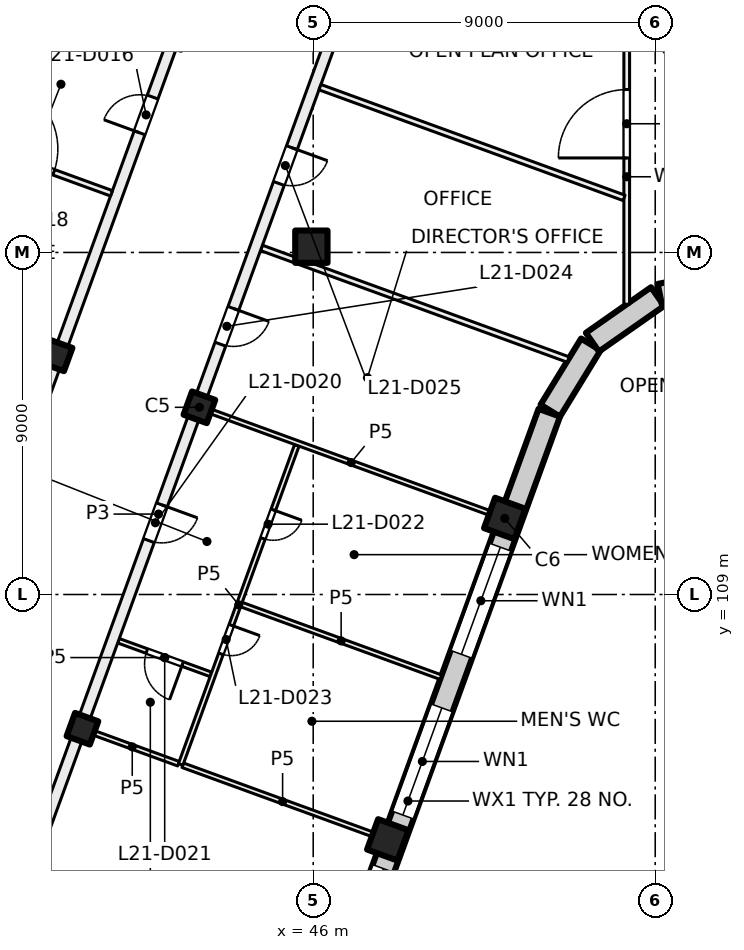
"""IFC4 building model, lengths in metres.
Left out: names, types, materials, properties, quantities, classifications, styles, units other than length and angle.
Written with IfcOpenShell. Run it as: python <this file> out.ifc"""

import sys

from ifc_helpers import new_model, si_unit, direction, frame, frame_2d, origin, origin_2d, place, context, subcontext, project, spatial, rectangle, hollow_rectangle, extrude, element, fill, save


model = new_model("IFC4")
c1 = context("Model", 3, precision=1e-05, world=origin(), true_north=direction((0.0, 1.0)))
c2 = subcontext(c1, "Body", "Model", "MODEL_VIEW")
j1 = project(units=[si_unit("LENGTHUNIT", "METRE"), si_unit("PLANEANGLEUNIT", "RADIAN")], contexts=[c1])
p1 = place(None, origin())
s1 = spatial("IfcSite", under=j1, at=p1, CompositionType="ELEMENT")
p2 = place(p1, origin())
s2 = spatial("IfcBuilding", under=s1, at=p2, CompositionType="ELEMENT")
p3 = place(p2, frame((0.0, 0.0, 93.0)))
s3 = spatial("IfcBuildingStorey", under=s2, at=p3, CompositionType="ELEMENT", Elevation=93.0)
p4 = place(p3, frame((56.036, 123.43, 0.0), z_axis=(0.0, 0.0, 1.0), x_axis=(0.573576436351, -0.819152044289, 0.0)))
e1 = element("IfcColumn", 1, at=p4, inside=s3, PredefinedType="COLUMN", context=c2, shape_type="SweptSolid", body=[
    extrude(hollow_rectangle(XDim=1.4, YDim=1.4, WallThickness=0.04, at=origin_2d()), origin(), (0.0, 0.0, 1.0), 4.0),
])
p5 = place(p3, frame((45.952, 118.152, 0.0), z_axis=(0.0, 0.0, 1.0), x_axis=(1.0, 0.0, 0.0)))
e2 = element("IfcColumn", 2, at=p5, inside=s3, PredefinedType="COLUMN", context=c2, shape_type="SweptSolid", body=[
    extrude(rectangle(XDim=0.85, YDim=0.85, at=origin_2d()), origin(), (0.0, 0.0, 1.0), 4.0),
])
for number, where, z_axis, x_axis in (
    (3, (43.006, 113.925, 0.0), (0.0, 0.0, 1.0), (-0.342, -0.94, 0.0)),
    (4, (39.927, 105.468, 0.0), (0.0, 0.0, 1.0), (-0.342, -0.94, 0.0)),
    (5, (39.247, 115.293, 0.0), (0.0, 0.0, 1.0), (-0.342, -0.94, 0.0)),
):
    element("IfcColumn", number, at=place(p3, frame(where, z_axis=z_axis, x_axis=x_axis)), inside=s3, PredefinedType="COLUMN", context=c2, shape_type="SweptSolid", body=[
        extrude(rectangle(XDim=0.65, YDim=0.65, at=origin_2d()), origin(), (0.0, 0.0, 1.0), 4.0),
    ])
for number, where, z_axis, x_axis in (
    (6, (51.04, 111.001, 0.0), (0.0, 0.0, 1.0), (-0.342, -0.94, 0.0)),
    (7, (47.962, 102.544, 0.0), (0.0, 0.0, 1.0), (-0.342, -0.94, 0.0)),
):
    element("IfcColumn", number, at=place(p3, frame(where, z_axis=z_axis, x_axis=x_axis)), inside=s3, PredefinedType="COLUMN", context=c2, shape_type="SweptSolid", body=[
        extrude(rectangle(XDim=0.85, YDim=0.85, at=origin_2d()), origin(), (0.0, 0.0, 1.0), 4.0),
    ])
p6 = place(p3, frame((52.212, 113.783, 0.0), z_axis=(0.0, 0.0, 1.0), x_axis=(-0.34202521188, -0.939690775968, 0.0)))
e8 = element("IfcWall", 8, at=p6, inside=s3, PredefinedType="SOLIDWALL", context=c2, shape_type="SweptSolid", body=[
    extrude(rectangle(XDim=21.745, YDim=0.6, at=frame_2d((10.873, 0.0))), origin(), (0.0, 0.0, 1.0), 3.625),
])
p7 = place(p6, frame((3.765, 0.0, 0.9)))
e9 = element("IfcOpeningElement", 9, at=p7, cuts=e8, PredefinedType="OPENING", context=c2, shape_type="SweptSolid", body=[
    extrude(rectangle(XDim=3.0, YDim=2.4, at=frame_2d((1.5, 1.2))), frame((0.0, 0.31, 0.0), z_axis=(0.0, -1.0, 0.0), x_axis=(1.0, 0.0, 0.0)), (0.0, 0.0, 1.0), 0.62),
])
p8 = place(p6, frame((8.265, 0.0, 0.9)))
e10 = element("IfcOpeningElement", 10, at=p8, cuts=e8, PredefinedType="OPENING", context=c2, shape_type="SweptSolid", body=[
    extrude(rectangle(XDim=3.0, YDim=2.4, at=frame_2d((1.5, 1.2))), frame((0.0, 0.31, 0.0), z_axis=(0.0, -1.0, 0.0), x_axis=(1.0, 0.0, 0.0)), (0.0, 0.0, 1.0), 0.62),
])
p9 = place(p6, frame((12.765, 0.0, 0.9)))
e11 = element("IfcOpeningElement", 11, at=p9, cuts=e8, PredefinedType="OPENING", context=c2, shape_type="SweptSolid", body=[
    extrude(rectangle(XDim=3.0, YDim=2.4, at=frame_2d((1.5, 1.2))), frame((0.0, 0.31, 0.0), z_axis=(0.0, -1.0, 0.0), x_axis=(1.0, 0.0, 0.0)), (0.0, 0.0, 1.0), 0.62),
])
p10 = place(p6, frame((17.265, 0.0, 0.9)))
e12 = element("IfcOpeningElement", 12, at=p10, cuts=e8, PredefinedType="OPENING", context=c2, shape_type="SweptSolid", body=[
    extrude(rectangle(XDim=3.0, YDim=2.4, at=frame_2d((1.5, 1.2))), frame((0.0, 0.31, 0.0), z_axis=(0.0, -1.0, 0.0), x_axis=(1.0, 0.0, 0.0)), (0.0, 0.0, 1.0), 0.62),
])
p11 = place(p3, frame((53.305, 115.578, 0.0), z_axis=(0.0, 0.0, 1.0), x_axis=(-0.522402266438, -0.852699168535, 0.0)))
e13 = element("IfcWall", 13, at=p11, inside=s3, PredefinedType="SOLIDWALL", context=c2, shape_type="SweptSolid", body=[
    extrude(rectangle(XDim=2.042, YDim=0.6, at=frame_2d((1.021, 0.0))), origin(), (0.0, 0.0, 1.0), 3.625),
])
for number, where, z_axis, x_axis in (
    (14, (55.062, 116.839, 0.0), (0.0, 0.0, 1.0), (-0.819, -0.574, 0.0)),
    (15, (57.175, 117.294, 0.0), (0.0, 0.0, 1.0), (-0.98, -0.199, 0.0)),
):
    element("IfcWall", number, at=place(p3, frame(where, z_axis=z_axis, x_axis=x_axis)), inside=s3, PredefinedType="SOLIDWALL", context=c2, shape_type="SweptSolid", body=[
        extrude(rectangle(XDim=2.092, YDim=0.6, at=frame_2d((1.046, 0.0))), origin(), (0.0, 0.0, 1.0), 3.625),
    ])
p12 = place(p3, frame((31.353, 118.166, 0.0), z_axis=(0.0, 0.0, 1.0), x_axis=(0.939687752599, -0.342033518263, 0.0)))
e16 = element("IfcWall", 16, at=p12, inside=s3, PredefinedType="PARTITIONING", context=c2, shape_type="SweptSolid", body=[
    extrude(rectangle(XDim=8.301, YDim=0.15, at=frame_2d((4.15, 0.0))), origin(), (0.0, 0.0, 1.0), 3.625),
])
p13 = place(p3, frame((32.881, 97.657, 0.0), z_axis=(0.0, 0.0, 1.0), x_axis=(0.342017360004, 0.939693633828, 0.0)))
e17 = element("IfcWall", 17, at=p13, inside=s3, PredefinedType="PARTITIONING", context=c2, shape_type="SweptSolid", body=[
    extrude(rectangle(XDim=34.516, YDim=0.3, at=frame_2d((17.258, 0.0))), origin(), (0.0, 0.0, 1.0), 3.625),
])
p14 = place(p13, frame((7.475, 0.0, 0.0)))
e18 = element("IfcOpeningElement", 18, at=p14, cuts=e17, PredefinedType="OPENING", context=c2, shape_type="SweptSolid", body=[
    extrude(rectangle(XDim=1.8, YDim=2.1, at=frame_2d((0.9, 1.05))), frame((0.0, 0.16, 0.0), z_axis=(0.0, -1.0, 0.0), x_axis=(1.0, 0.0, 0.0)), (0.0, 0.0, 1.0), 0.32),
])
p15 = place(p13, frame((25.0, 0.0, 0.0)))
e19 = element("IfcOpeningElement", 19, at=p15, cuts=e17, PredefinedType="OPENING", context=c2, shape_type="SweptSolid", body=[
    extrude(rectangle(XDim=1.0, YDim=2.1, at=frame_2d((0.5, 1.05))), frame((0.0, 0.16, 0.0), z_axis=(0.0, -1.0, 0.0), x_axis=(1.0, 0.0, 0.0)), (0.0, 0.0, 1.0), 0.32),
])
p16 = place(p13, frame((29.779, 0.0, 0.0)))
e20 = element("IfcOpeningElement", 20, at=p16, cuts=e17, PredefinedType="OPENING", context=c2, shape_type="SweptSolid", body=[
    extrude(rectangle(XDim=1.8, YDim=2.1, at=frame_2d((0.9, 1.05))), frame((0.0, 0.16, 0.0), z_axis=(0.0, -1.0, 0.0), x_axis=(1.0, 0.0, 0.0)), (0.0, 0.0, 1.0), 0.32),
])
p17 = place(p3, frame((32.892, 122.395, 0.0), z_axis=(0.0, 0.0, 1.0), x_axis=(0.939684311623, -0.3420429717, 0.0)))
e21 = element("IfcWall", 21, at=p17, inside=s3, PredefinedType="PARTITIONING", context=c2, shape_type="SweptSolid", body=[
    extrude(rectangle(XDim=8.301, YDim=0.15, at=frame_2d((4.15, 0.0))), origin(), (0.0, 0.0, 1.0), 3.625),
])
p18 = place(p17, frame((1.125, 0.0, 0.0)))
e22 = element("IfcOpeningElement", 22, at=p18, cuts=e21, PredefinedType="OPENING", context=c2, shape_type="SweptSolid", body=[
    extrude(rectangle(XDim=1.0, YDim=2.1, at=frame_2d((0.5, 1.05))), frame((0.0, 0.085, 0.0), z_axis=(0.0, -1.0, 0.0), x_axis=(1.0, 0.0, 0.0)), (0.0, 0.0, 1.0), 0.17),
])
p19 = place(p17, frame((4.884, 0.0, 0.0)))
e23 = element("IfcOpeningElement", 23, at=p19, cuts=e21, PredefinedType="OPENING", context=c2, shape_type="SweptSolid", body=[
    extrude(rectangle(XDim=1.8, YDim=2.1, at=frame_2d((0.9, 1.05))), frame((0.0, 0.085, 0.0), z_axis=(0.0, -1.0, 0.0), x_axis=(1.0, 0.0, 0.0)), (0.0, 0.0, 1.0), 0.17),
])
p20 = place(p3, frame((40.021, 105.434, 0.0), z_axis=(0.0, 0.0, 1.0), x_axis=(0.939564838351, -0.342371018829, 0.0)))
e24 = element("IfcWall", 24, at=p20, inside=s3, PredefinedType="PARTITIONING", context=c2, shape_type="SweptSolid", body=[
    extrude(rectangle(XDim=2.591, YDim=0.125, at=frame_2d((1.295, 0.0))), origin(), (0.0, 0.0, 1.0), 3.625),
])
p21 = place(p3, frame((43.308, 106.898, 0.0), z_axis=(0.0, 0.0, 1.0), x_axis=(-0.93971903862, 0.341947552198, 0.0)))
e25 = element("IfcWall", 25, at=p21, inside=s3, PredefinedType="PARTITIONING", context=c2, shape_type="SweptSolid", body=[
    extrude(rectangle(XDim=2.588, YDim=0.125, at=frame_2d((1.294, 0.0))), origin(), (0.0, 0.0, 1.0), 3.625),
])
p22 = place(p21, frame((0.794, 0.0, 0.0)))
e26 = element("IfcOpeningElement", 26, at=p22, cuts=e25, PredefinedType="OPENING", context=c2, shape_type="SweptSolid", body=[
    extrude(rectangle(XDim=1.0, YDim=2.1, at=frame_2d((0.5, 1.05))), frame((0.0, 0.073, 0.0), z_axis=(0.0, -1.0, 0.0), x_axis=(1.0, 0.0, 0.0)), (0.0, 0.0, 1.0), 0.145),
])
p23 = place(p3, frame((42.568, 104.507, 0.0), z_axis=(0.0, 0.0, 1.0), x_axis=(0.939681160367, -0.342051628927, 0.0)))
e27 = element("IfcWall", 27, at=p23, inside=s3, PredefinedType="PARTITIONING", context=c2, shape_type="SweptSolid", body=[
    extrude(rectangle(XDim=5.59, YDim=0.125, at=frame_2d((2.795, 0.0))), origin(), (0.0, 0.0, 1.0), 3.625),
])
p24 = place(p3, frame((45.569, 112.926, 0.0), z_axis=(0.0, 0.0, 1.0), x_axis=(-0.342072050759, -0.939673726402, 0.0)))
e28 = element("IfcWall", 28, at=p24, inside=s3, PredefinedType="PARTITIONING", context=c2, shape_type="SweptSolid", body=[
    extrude(rectangle(XDim=8.937, YDim=0.125, at=frame_2d((4.469, 0.0))), origin(), (0.0, 0.0, 1.0), 3.625),
])
p25 = place(p24, frame((1.809, 0.0, 0.0)))
e29 = element("IfcOpeningElement", 29, at=p25, cuts=e28, PredefinedType="OPENING", context=c2, shape_type="SweptSolid", body=[
    extrude(rectangle(XDim=0.8, YDim=2.1, at=frame_2d((0.4, 1.05))), frame((0.0, 0.073, 0.0), z_axis=(0.0, -1.0, 0.0), x_axis=(1.0, 0.0, 0.0)), (0.0, 0.0, 1.0), 0.145),
])
p26 = place(p24, frame((5.039, 0.0, 0.0)))
e30 = element("IfcOpeningElement", 30, at=p26, cuts=e28, PredefinedType="OPENING", context=c2, shape_type="SweptSolid", body=[
    extrude(rectangle(XDim=0.8, YDim=2.1, at=frame_2d((0.4, 1.05))), frame((0.0, 0.073, 0.0), z_axis=(0.0, -1.0, 0.0), x_axis=(1.0, 0.0, 0.0)), (0.0, 0.0, 1.0), 0.145),
])
p27 = place(p3, frame((43.1, 113.891, 0.0), z_axis=(0.0, 0.0, 1.0), x_axis=(0.939670544866, -0.342080790328, 0.0)))
e31 = element("IfcWall", 31, at=p27, inside=s3, PredefinedType="PARTITIONING", context=c2, shape_type="SweptSolid", body=[
    extrude(rectangle(XDim=8.3, YDim=0.125, at=frame_2d((4.15, 0.0))), origin(), (0.0, 0.0, 1.0), 3.625),
])
p28 = place(p3, frame((44.11, 108.735, 0.0), z_axis=(0.0, 0.0, 1.0), x_axis=(0.93967599021, -0.342065832002, 0.0)))
e32 = element("IfcWall", 32, at=p28, inside=s3, PredefinedType="PARTITIONING", context=c2, shape_type="SweptSolid", body=[
    extrude(rectangle(XDim=5.587, YDim=0.125, at=frame_2d((2.793, 0.0))), origin(), (0.0, 0.0, 1.0), 3.625),
])
p29 = place(p3, frame((44.639, 118.12, 0.0), z_axis=(0.0, 0.0, 1.0), x_axis=(0.939669707102, -0.342083091593, 0.0)))
e33 = element("IfcWall", 33, at=p29, inside=s3, PredefinedType="PARTITIONING", context=c2, shape_type="SweptSolid", body=[
    extrude(rectangle(XDim=8.589, YDim=0.15, at=frame_2d((4.295, 0.0))), origin(), (0.0, 0.0, 1.0), 3.625),
])
p30 = place(p3, frame((47.314, 125.909, 0.0), z_axis=(0.0, 0.0, 1.0), x_axis=(-0.342010770371, -0.939696032209, 0.0)))
e34 = element("IfcWall", 34, at=p30, inside=s3, PredefinedType="PARTITIONING", context=c2, shape_type="SweptSolid", body=[
    extrude(rectangle(XDim=31.485, YDim=0.3, at=frame_2d((15.742, 0.0))), origin(), (0.0, 0.0, 1.0), 3.625),
])
p31 = place(p30, frame((26.11, 0.0, 0.0)))
e35 = element("IfcOpeningElement", 35, at=p31, cuts=e34, PredefinedType="OPENING", context=c2, shape_type="SweptSolid", body=[
    extrude(rectangle(XDim=1.0, YDim=2.1, at=frame_2d((0.5, 1.05))), frame((0.0, 0.16, 0.0), z_axis=(0.0, -1.0, 0.0), x_axis=(1.0, 0.0, 0.0)), (0.0, 0.0, 1.0), 0.32),
])
p32 = place(p30, frame((15.485, 0.0, 0.0)))
e36 = element("IfcOpeningElement", 36, at=p32, cuts=e34, PredefinedType="OPENING", context=c2, shape_type="SweptSolid", body=[
    extrude(rectangle(XDim=1.0, YDim=2.1, at=frame_2d((0.5, 1.05))), frame((0.0, 0.16, 0.0), z_axis=(0.0, -1.0, 0.0), x_axis=(1.0, 0.0, 0.0)), (0.0, 0.0, 1.0), 0.32),
])
p33 = place(p30, frame((9.985, 0.0, 0.0)))
e37 = element("IfcOpeningElement", 37, at=p33, cuts=e34, PredefinedType="OPENING", context=c2, shape_type="SweptSolid", body=[
    extrude(rectangle(XDim=1.0, YDim=2.1, at=frame_2d((0.5, 1.05))), frame((0.0, 0.16, 0.0), z_axis=(0.0, -1.0, 0.0), x_axis=(1.0, 0.0, 0.0)), (0.0, 0.0, 1.0), 0.32),
])
p34 = place(p30, frame((5.484, 0.0, 0.0)))
e38 = element("IfcOpeningElement", 38, at=p34, cuts=e34, PredefinedType="OPENING", context=c2, shape_type="SweptSolid", body=[
    extrude(rectangle(XDim=1.0, YDim=2.1, at=frame_2d((0.5, 1.05))), frame((0.0, 0.16, 0.0), z_axis=(0.0, -1.0, 0.0), x_axis=(1.0, 0.0, 0.0)), (0.0, 0.0, 1.0), 0.32),
])
p35 = place(p3, frame((54.25, 116.637, 0.0), z_axis=(0.0, 0.0, 1.0), x_axis=(0.0, 1.0, 0.0)))
e39 = element("IfcWall", 39, at=p35, inside=s3, PredefinedType="PARTITIONING", context=c2, shape_type="SweptSolid", body=[
    extrude(rectangle(XDim=6.709, YDim=0.15, at=frame_2d((3.354, 0.0))), origin(), (0.0, 0.0, 1.0), 3.625),
])
p36 = place(p35, frame((3.85, 0.0, 0.0)))
e40 = element("IfcOpeningElement", 40, at=p36, cuts=e39, PredefinedType="OPENING", context=c2, shape_type="SweptSolid", body=[
    extrude(rectangle(XDim=1.8, YDim=2.1, at=frame_2d((0.9, 1.05))), frame((0.0, 0.085, 0.0), z_axis=(0.0, -1.0, 0.0), x_axis=(1.0, 0.0, 0.0)), (0.0, 0.0, 1.0), 0.17),
])
p37 = place(p3, frame((54.18, 119.436, 0.0), z_axis=(0.0, 0.0, 1.0), x_axis=(-0.939669476286, 0.342083725624, 0.0)))
e41 = element("IfcWall", 41, at=p37, inside=s3, PredefinedType="PARTITIONING", context=c2, shape_type="SweptSolid", body=[
    extrude(rectangle(XDim=8.516, YDim=0.15, at=frame_2d((4.258, 0.0))), origin(), (0.0, 0.0, 1.0), 3.625),
])
p38 = place(p7, origin())
e42 = element("IfcWindow", 42, at=p38, inside=s3, PartitioningType="SINGLE_PANEL", PredefinedType="WINDOW", context=c2, shape_type="SweptSolid", body=[
    extrude(rectangle(XDim=3.0, YDim=2.4, at=frame_2d((1.5, 1.2))), frame((0.0, 0.03, 0.0), z_axis=(0.0, -1.0, 0.0), x_axis=(1.0, 0.0, 0.0)), (0.0, 0.0, 1.0), 0.06),
])
fill(e9, e42)
p39 = place(p8, origin())
e43 = element("IfcWindow", 43, at=p39, inside=s3, PartitioningType="SINGLE_PANEL", PredefinedType="WINDOW", context=c2, shape_type="SweptSolid", body=[
    extrude(rectangle(XDim=3.0, YDim=2.4, at=frame_2d((1.5, 1.2))), frame((0.0, 0.03, 0.0), z_axis=(0.0, -1.0, 0.0), x_axis=(1.0, 0.0, 0.0)), (0.0, 0.0, 1.0), 0.06),
])
fill(e10, e43)
p40 = place(p9, origin())
e44 = element("IfcWindow", 44, at=p40, inside=s3, PartitioningType="SINGLE_PANEL", PredefinedType="WINDOW", context=c2, shape_type="SweptSolid", body=[
    extrude(rectangle(XDim=3.0, YDim=2.4, at=frame_2d((1.5, 1.2))), frame((0.0, 0.03, 0.0), z_axis=(0.0, -1.0, 0.0), x_axis=(1.0, 0.0, 0.0)), (0.0, 0.0, 1.0), 0.06),
])
fill(e11, e44)
p41 = place(p36, origin())
e45 = element("IfcDoor", 45, at=p41, inside=s3, OperationType="DOUBLE_DOOR_SINGLE_SWING", PredefinedType="DOOR", context=c2, shape_type="SweptSolid", body=[
    extrude(rectangle(XDim=1.8, YDim=2.1, at=frame_2d((0.9, 1.05))), frame((0.0, 0.025, 0.0), z_axis=(0.0, -1.0, 0.0), x_axis=(1.0, 0.0, 0.0)), (0.0, 0.0, 1.0), 0.05),
])
fill(e40, e45)
p42 = place(p15, origin())
e46 = element("IfcDoor", 46, at=p42, inside=s3, OperationType="SINGLE_SWING_LEFT", PredefinedType="DOOR", context=c2, shape_type="SweptSolid", body=[
    extrude(rectangle(XDim=1.0, YDim=2.1, at=frame_2d((0.5, 1.05))), frame((0.0, 0.025, 0.0), z_axis=(0.0, -1.0, 0.0), x_axis=(1.0, 0.0, 0.0)), (0.0, 0.0, 1.0), 0.05),
])
fill(e19, e46)
p43 = place(p19, origin())
e47 = element("IfcDoor", 47, at=p43, inside=s3, OperationType="DOUBLE_DOOR_SINGLE_SWING", PredefinedType="DOOR", context=c2, shape_type="SweptSolid", body=[
    extrude(rectangle(XDim=1.8, YDim=2.1, at=frame_2d((0.9, 1.05))), frame((0.0, 0.025, 0.0), z_axis=(0.0, -1.0, 0.0), x_axis=(1.0, 0.0, 0.0)), (0.0, 0.0, 1.0), 0.05),
])
fill(e23, e47)
p44 = place(p32, origin())
e48 = element("IfcDoor", 48, at=p44, inside=s3, OperationType="SINGLE_SWING_LEFT", PredefinedType="DOOR", context=c2, shape_type="SweptSolid", body=[
    extrude(rectangle(XDim=1.0, YDim=2.1, at=frame_2d((0.5, 1.05))), frame((0.0, 0.025, 0.0), z_axis=(0.0, -1.0, 0.0), x_axis=(1.0, 0.0, 0.0)), (0.0, 0.0, 1.0), 0.05),
])
fill(e36, e48)
p45 = place(p22, origin())
e49 = element("IfcDoor", 49, at=p45, inside=s3, OperationType="SINGLE_SWING_RIGHT", PredefinedType="DOOR", context=c2, shape_type="SweptSolid", body=[
    extrude(rectangle(XDim=1.0, YDim=2.1, at=frame_2d((0.5, 1.05))), frame((0.0, 0.025, 0.0), z_axis=(0.0, -1.0, 0.0), x_axis=(1.0, 0.0, 0.0)), (0.0, 0.0, 1.0), 0.05),
])
fill(e26, e49)
p46 = place(p25, origin())
e50 = element("IfcDoor", 50, at=p46, inside=s3, OperationType="SINGLE_SWING_RIGHT", PredefinedType="DOOR", context=c2, shape_type="SweptSolid", body=[
    extrude(rectangle(XDim=0.8, YDim=2.1, at=frame_2d((0.4, 1.05))), frame((0.0, 0.025, 0.0), z_axis=(0.0, -1.0, 0.0), x_axis=(1.0, 0.0, 0.0)), (0.0, 0.0, 1.0), 0.05),
])
fill(e29, e50)
p47 = place(p26, origin())
e51 = element("IfcDoor", 51, at=p47, inside=s3, OperationType="SINGLE_SWING_LEFT", PredefinedType="DOOR", context=c2, shape_type="SweptSolid", body=[
    extrude(rectangle(XDim=0.8, YDim=2.1, at=frame_2d((0.4, 1.05))), frame((0.0, 0.025, 0.0), z_axis=(0.0, -1.0, 0.0), x_axis=(1.0, 0.0, 0.0)), (0.0, 0.0, 1.0), 0.05),
])
fill(e30, e51)
p48 = place(p33, origin())
e52 = element("IfcDoor", 52, at=p48, inside=s3, OperationType="SINGLE_SWING_LEFT", PredefinedType="DOOR", context=c2, shape_type="SweptSolid", body=[
    extrude(rectangle(XDim=1.0, YDim=2.1, at=frame_2d((0.5, 1.05))), frame((0.0, 0.025, 0.0), z_axis=(0.0, -1.0, 0.0), x_axis=(1.0, 0.0, 0.0)), (0.0, 0.0, 1.0), 0.05),
])
fill(e37, e52)
p49 = place(p34, origin())
e53 = element("IfcDoor", 53, at=p49, inside=s3, OperationType="SINGLE_SWING_LEFT", PredefinedType="DOOR", context=c2, shape_type="SweptSolid", body=[
    extrude(rectangle(XDim=1.0, YDim=2.1, at=frame_2d((0.5, 1.05))), frame((0.0, 0.025, 0.0), z_axis=(0.0, -1.0, 0.0), x_axis=(1.0, 0.0, 0.0)), (0.0, 0.0, 1.0), 0.05),
])
fill(e38, e53)
save(model, sys.argv[1])
